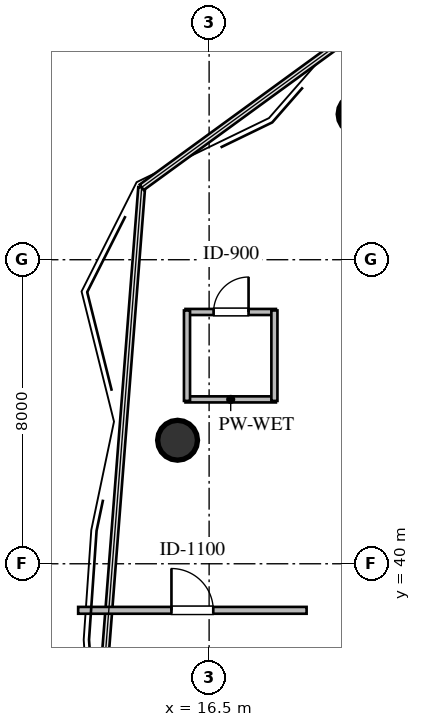
"""IFC4 building model, lengths in metres.
Left out: names, types, materials, properties, quantities, classifications, styles, units other than length and angle.
Written with IfcOpenShell. Run it as: python <this file> out.ifc"""

import sys

from ifc_helpers import new_model, si_unit, direction, frame, frame_2d, origin, origin_2d, place, context, subcontext, project, spatial, rectangle, circle, extrude, element, fill, save


model = new_model("IFC4")
c1 = context("Model", 3, precision=1e-05, world=origin(), true_north=direction((0.0, 1.0)))
c2 = subcontext(c1, "Body", "Model", "MODEL_VIEW")
j1 = project(units=[si_unit("LENGTHUNIT", "METRE"), si_unit("PLANEANGLEUNIT", "RADIAN")], contexts=[c1])
p1 = place(None, origin())
s1 = spatial("IfcSite", under=j1, at=p1, CompositionType="ELEMENT")
p2 = place(p1, origin())
s2 = spatial("IfcBuilding", under=s1, at=p2, CompositionType="ELEMENT")
p3 = place(p2, frame((0.0, 0.0, 242.4)))
s3 = spatial("IfcBuildingStorey", under=s2, at=p3, CompositionType="ELEMENT", Elevation=242.4)
for number, where, z_axis, x_axis in (
    (1, (20.42, 51.83, 0.0), (0.0, 0.0, 1.0), (1.0, 0.0, 0.0)),
    (2, (15.67, 43.25, 0.0), (0.0, 0.0, 1.0), (1.0, 0.0, 0.0)),
):
    element("IfcColumn", number, at=place(p3, frame(where, z_axis=z_axis, x_axis=x_axis)), inside=s3, PredefinedType="COLUMN", context=c2, shape_type="SweptSolid", body=[
        extrude(circle(Radius=0.525, at=origin_2d()), origin(), (0.0, 0.0, 1.0), 3.6),
    ])
p4 = place(p3, frame((15.878, 44.325, 0.0), z_axis=(0.0, 0.0, 1.0), x_axis=(1.0, 0.0, 0.0)))
e3 = element("IfcWall", 3, at=p4, inside=s3, PredefinedType="PLUMBINGWALL", context=c2, shape_type="SweptSolid", body=[
    extrude(rectangle(XDim=2.38, YDim=0.16, at=frame_2d((1.19, 0.0))), origin(), (0.0, 0.0, 1.0), 3.36),
])
p5 = place(p3, frame((15.878, 46.625, 0.0), z_axis=(0.0, 0.0, 1.0), x_axis=(1.0, 0.0, 0.0)))
e4 = element("IfcWall", 4, at=p5, inside=s3, PredefinedType="PLUMBINGWALL", context=c2, shape_type="SweptSolid", body=[
    extrude(rectangle(XDim=2.38, YDim=0.16, at=frame_2d((1.19, 0.0))), origin(), (0.0, 0.0, 1.0), 3.36),
])
p6 = place(p5, frame((0.74, 0.0, 0.0)))
e5 = element("IfcOpeningElement", 5, at=p6, cuts=e4, PredefinedType="OPENING", context=c2, shape_type="SweptSolid", body=[
    extrude(rectangle(XDim=0.92, YDim=2.1, at=frame_2d((0.46, 1.05))), frame((0.0, 0.09, 0.0), z_axis=(0.0, -1.0, 0.0), x_axis=(1.0, 0.0, 0.0)), (0.0, 0.0, 1.0), 0.18),
])
for number, where, z_axis, x_axis in (
    (6, (15.918, 44.285, 0.0), (0.0, 0.0, 1.0), (0.0, 1.0, 0.0)),
    (7, (18.218, 44.285, 0.0), (0.0, 0.0, 1.0), (0.0, 1.0, 0.0)),
):
    element("IfcWall", number, at=place(p3, frame(where, z_axis=z_axis, x_axis=x_axis)), inside=s3, PredefinedType="PLUMBINGWALL", context=c2, shape_type="SweptSolid", body=[
        extrude(rectangle(XDim=2.38, YDim=0.16, at=frame_2d((1.19, 0.0))), origin(), (0.0, 0.0, 1.0), 3.36),
    ])
p7 = place(p3, frame((13.054, 38.775, 0.0), z_axis=(0.0, 0.0, 1.0), x_axis=(1.0, 0.0, 0.0)))
e8 = element("IfcWall", 8, at=p7, inside=s3, PredefinedType="PARTITIONING", context=c2, shape_type="SweptSolid", body=[
    extrude(rectangle(XDim=6.011, YDim=0.18, at=frame_2d((3.005, 0.0))), origin(), (0.0, 0.0, 1.0), 3.36),
])
p8 = place(p7, frame((2.455, 0.0, 0.0)))
e9 = element("IfcOpeningElement", 9, at=p8, cuts=e8, PredefinedType="OPENING", context=c2, shape_type="SweptSolid", body=[
    extrude(rectangle(XDim=1.1, YDim=2.1, at=frame_2d((0.55, 1.05))), frame((0.0, 0.1, 0.0), z_axis=(0.0, -1.0, 0.0), x_axis=(1.0, 0.0, 0.0)), (0.0, 0.0, 1.0), 0.2),
])
p9 = place(p6, origin())
e10 = element("IfcDoor", 10, at=p9, inside=s3, OperationType="SINGLE_SWING_RIGHT", PredefinedType="DOOR", context=c2, shape_type="SweptSolid", body=[
    extrude(rectangle(XDim=0.92, YDim=2.1, at=frame_2d((0.46, 1.05))), frame((0.0, 0.025, 0.0), z_axis=(0.0, -1.0, 0.0), x_axis=(1.0, 0.0, 0.0)), (0.0, 0.0, 1.0), 0.05),
])
fill(e5, e10)
p10 = place(p8, origin())
e11 = element("IfcDoor", 11, at=p10, inside=s3, OperationType="SINGLE_SWING_LEFT", PredefinedType="DOOR", context=c2, shape_type="SweptSolid", body=[
    extrude(rectangle(XDim=1.1, YDim=2.1, at=frame_2d((0.55, 1.05))), frame((0.0, 0.025, 0.0), z_axis=(0.0, -1.0, 0.0), x_axis=(1.0, 0.0, 0.0)), (0.0, 0.0, 1.0), 0.05),
])
fill(e9, e11)
save(model, sys.argv[1])
